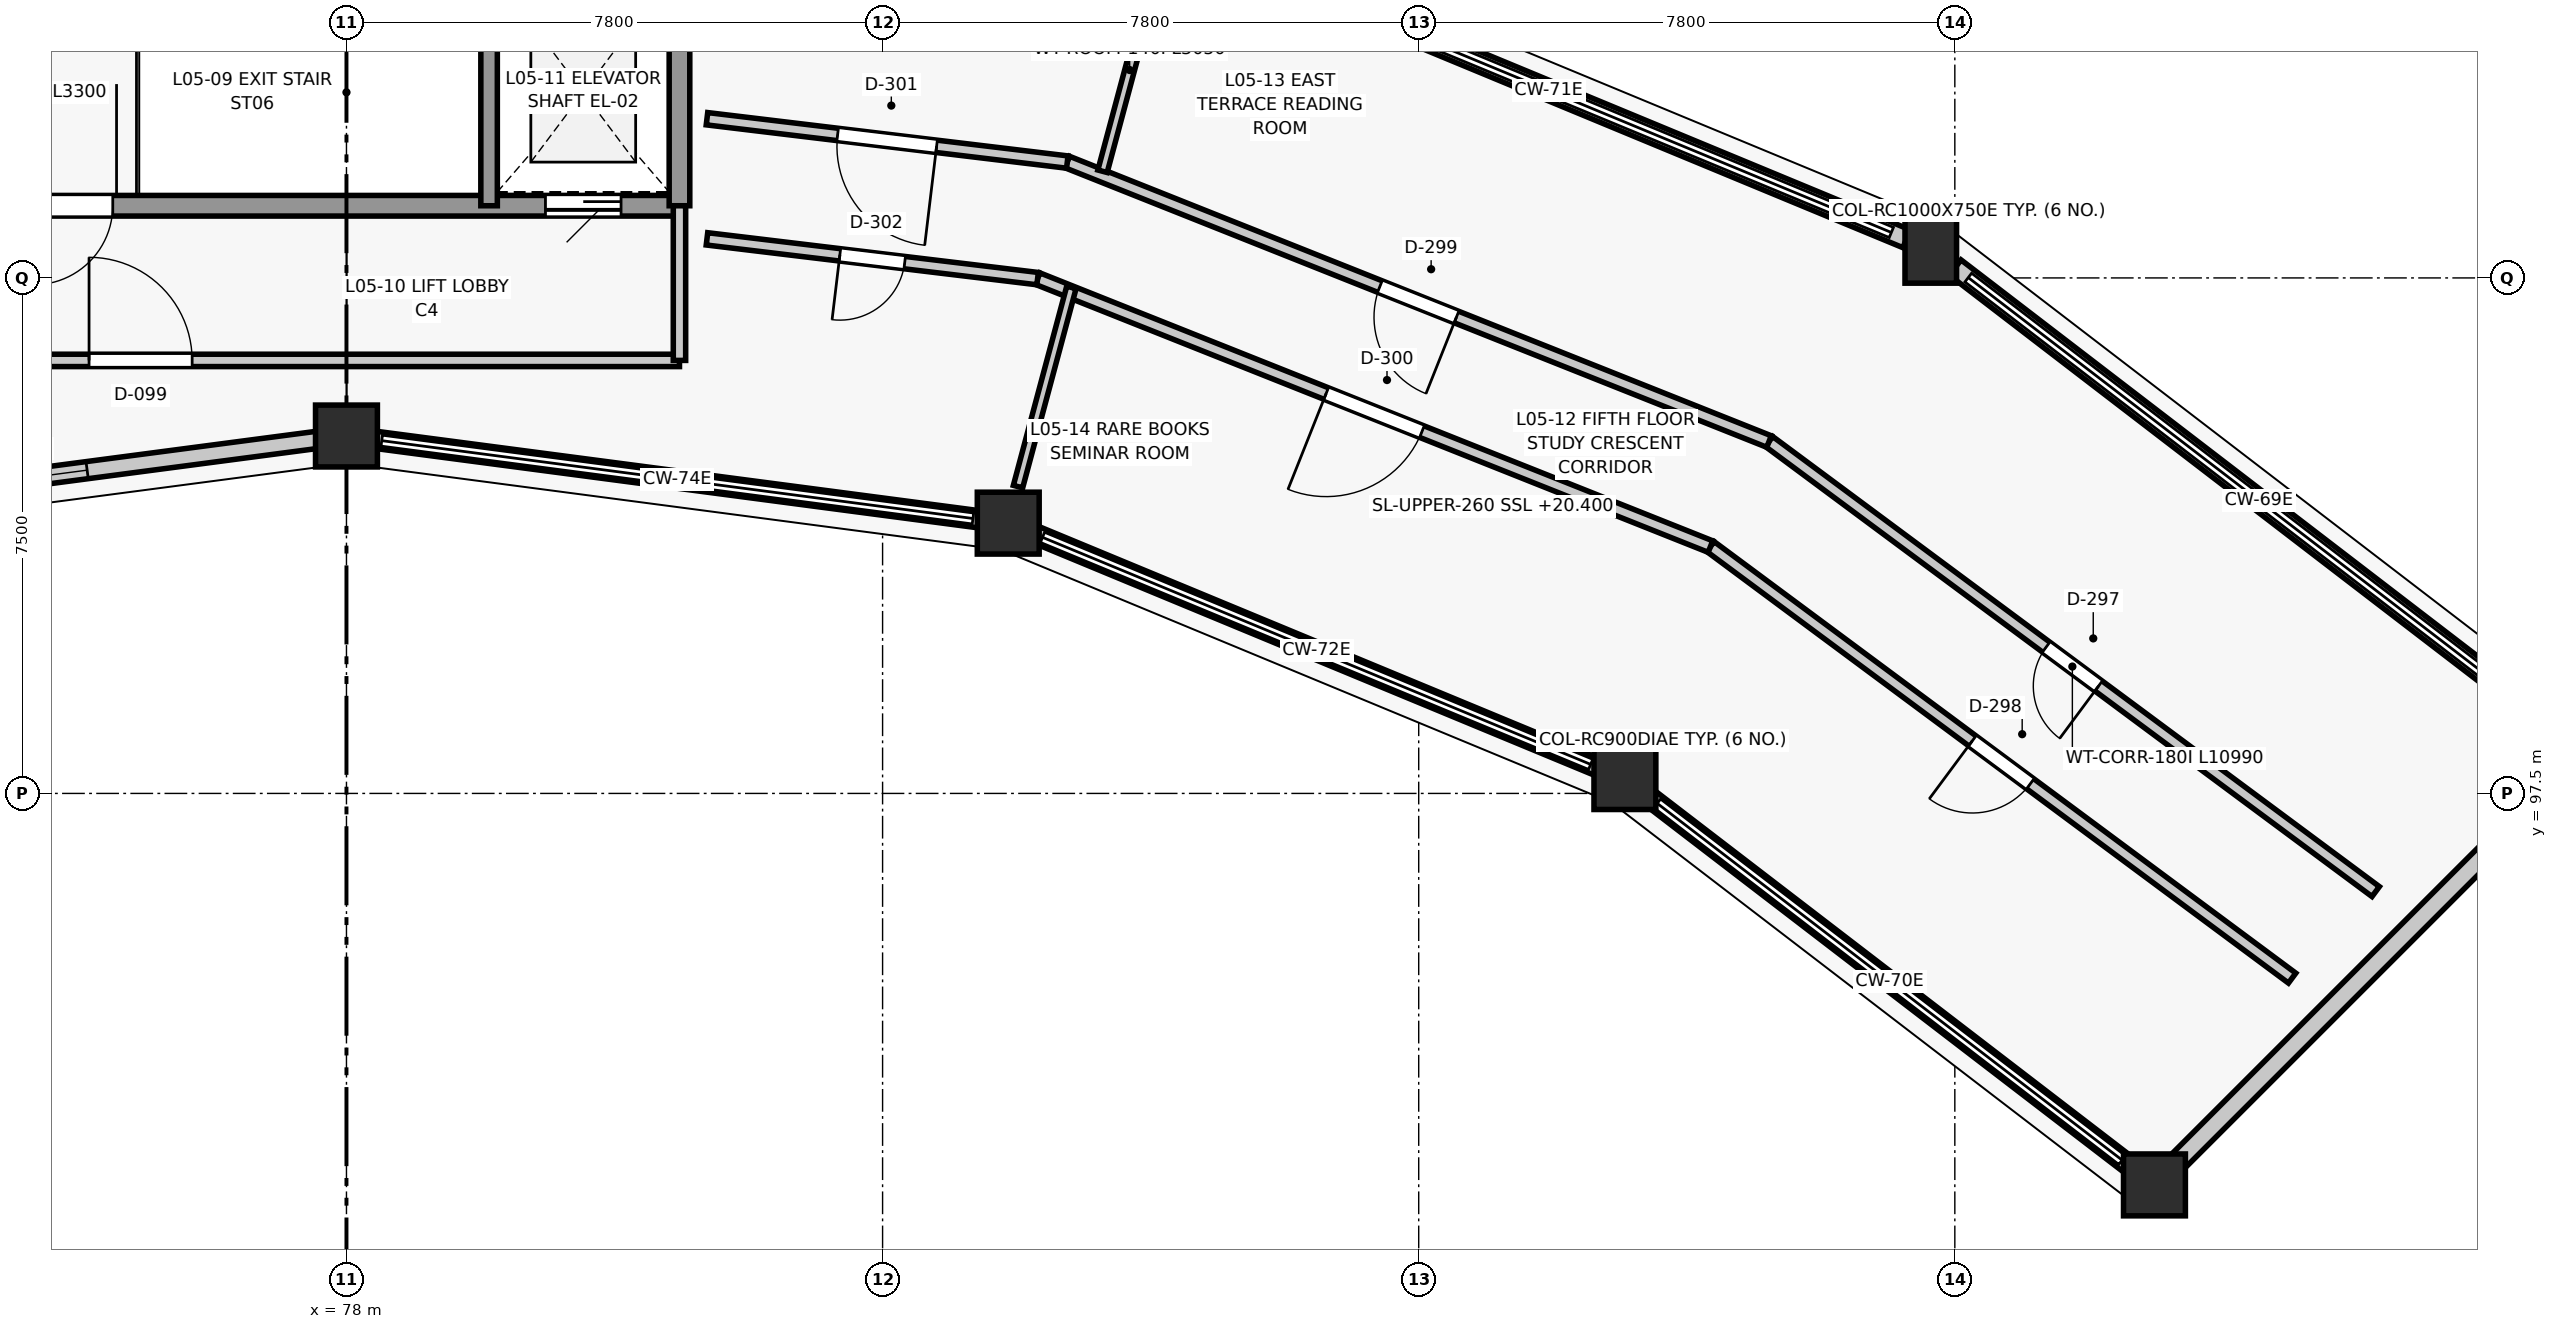
"""IFC4 building model, lengths in metres.
Left out: names, types, materials, properties, quantities, classifications, styles, units other than length and angle.
Written with IfcOpenShell. Run it as: python <this file> out.ifc"""

import sys

from ifc_helpers import new_model, si_unit, direction, frame, frame_2d, origin, origin_2d, place, context, subcontext, project, spatial, rectangle, circle, extrude, element, fill, save


model = new_model("IFC4")
c1 = context("Model", 3, precision=1e-05, world=origin(), true_north=direction((0.0, 1.0)))
c2 = subcontext(c1, "Body", "Model", "MODEL_VIEW")
j1 = project(units=[si_unit("LENGTHUNIT", "METRE"), si_unit("PLANEANGLEUNIT", "RADIAN")], contexts=[c1])
p1 = place(None, origin())
s1 = spatial("IfcSite", under=j1, at=p1, CompositionType="ELEMENT")
p2 = place(p1, origin())
s2 = spatial("IfcBuilding", under=s1, at=p2, CompositionType="ELEMENT")
p3 = place(p2, frame((0.0, 0.0, 20.4)))
s3 = spatial("IfcBuildingStorey", under=s2, at=p3, CompositionType="ELEMENT", Elevation=20.4)
for number, where, z_axis, x_axis in (
    (1, (96.6, 97.716, 0.0), (0.0, 0.0, 1.0), (1.0, 0.0, 0.0)),
    (2, (87.628, 101.432, 0.0), (0.0, 0.0, 1.0), (1.0, 0.0, 0.0)),
    (3, (78.0, 102.7, 0.0), (0.0, 0.0, 1.0), (1.0, 0.0, 0.0)),
):
    element("IfcColumn", number, at=place(p3, frame(where, z_axis=z_axis, x_axis=x_axis)), inside=s3, PredefinedType="COLUMN", context=c2, shape_type="SweptSolid", body=[
        extrude(circle(Radius=0.45, at=origin_2d()), origin(), (0.0, 0.0, 1.0), 3.9),
    ])
p4 = place(p3, frame((101.05, 105.424, 0.0), z_axis=(0.0, 0.0, 1.0), x_axis=(1.0, 0.0, 0.0)))
e4 = element("IfcColumn", 4, at=p4, inside=s3, PredefinedType="COLUMN", context=c2, shape_type="SweptSolid", body=[
    extrude(rectangle(XDim=0.75, YDim=1.0, at=origin_2d()), origin(), (0.0, 0.0, 1.0), 3.9),
])
p5 = place(p3, frame((104.304, 91.804, 0.0), z_axis=(0.0, 0.0, 1.0), x_axis=(1.0, 0.0, 0.0)))
e5 = element("IfcColumn", 5, at=p5, inside=s3, PredefinedType="COLUMN", context=c2, shape_type="SweptSolid", body=[
    extrude(circle(Radius=0.45, at=origin_2d()), origin(), (0.0, 0.0, 1.0), 3.9),
])
p6 = place(p3, frame((101.405, 105.151, 0.0), z_axis=(0.0, 0.0, 1.0), x_axis=(0.793342066679, -0.608776120785, 0.0)))
e6 = element("IfcWall", 6, at=p6, inside=s3, PredefinedType="STANDARD", context=c2, shape_type="SweptSolid", body=[
    extrude(rectangle(XDim=11.139, YDim=0.28, at=frame_2d((5.57, 0.0))), origin(), (0.0, 0.0, 1.0), 0.82),
])
p7 = place(p3, frame((104.024, 92.019, 0.0), z_axis=(0.0, 0.0, 1.0), x_axis=(-0.793347085527, 0.608769580289, 0.0)))
e7 = element("IfcWall", 7, at=p7, inside=s3, PredefinedType="STANDARD", context=c2, shape_type="SweptSolid", body=[
    extrude(rectangle(XDim=9.005, YDim=0.25, at=frame_2d((4.502, 0.0))), origin(), (0.0, 0.0, 1.0), 0.82),
])
p8 = place(p3, frame((90.283, 109.883, 0.0), z_axis=(0.0, 0.0, 1.0), x_axis=(0.923883530636, -0.382673779896, 0.0)))
e8 = element("IfcWall", 8, at=p8, inside=s3, PredefinedType="STANDARD", context=c2, shape_type="SweptSolid", body=[
    extrude(rectangle(XDim=11.272, YDim=0.28, at=frame_2d((5.636, 0.0))), origin(), (0.0, 0.0, 1.0), 0.82),
])
p9 = place(p3, frame((96.323, 97.831, 0.0), z_axis=(0.0, 0.0, 1.0), x_axis=(-0.923880324771, 0.382681519675, 0.0)))
e9 = element("IfcWall", 9, at=p9, inside=s3, PredefinedType="STANDARD", context=c2, shape_type="SweptSolid", body=[
    extrude(rectangle(XDim=9.112, YDim=0.25, at=frame_2d((4.556, 0.0))), origin(), (0.0, 0.0, 1.0), 0.82),
])
p10 = place(p3, frame((87.353, 101.469, 0.0), z_axis=(0.0, 0.0, 1.0), x_axis=(-0.991441766434, 0.130549698469, 0.0)))
e10 = element("IfcWall", 10, at=p10, inside=s3, PredefinedType="STANDARD", context=c2, shape_type="SweptSolid", body=[
    extrude(rectangle(XDim=9.156, YDim=0.25, at=frame_2d((4.578, 0.0))), origin(), (0.0, 0.0, 1.0), 0.82),
])
p11 = place(p3, frame((77.725, 102.664, 0.0), z_axis=(0.0, 0.0, 1.0), x_axis=(-0.991441766434, -0.130549698469, 0.0)))
e11 = element("IfcWall", 11, at=p11, inside=s3, PredefinedType="STANDARD", context=c2, shape_type="SweptSolid", body=[
    extrude(rectangle(XDim=9.156, YDim=0.25, at=frame_2d((4.578, 0.0))), origin(), (0.0, 0.0, 1.0), 2.969),
])
p12 = place(p11, frame((3.528, 0.0, 0.85)))
e12 = element("IfcOpeningElement", 12, at=p12, cuts=e11, PredefinedType="OPENING", context=c2, shape_type="SweptSolid", body=[
    extrude(rectangle(XDim=2.1, YDim=1.75, at=frame_2d((1.05, 0.875))), frame((0.0, 0.135, 0.0), z_axis=(0.0, -1.0, 0.0), x_axis=(1.0, 0.0, 0.0)), (0.0, 0.0, 1.0), 0.27),
])
p13 = place(p3, frame((110.24, 97.74, 0.0), z_axis=(0.0, 0.0, 1.0), x_axis=(-0.707106781187, -0.707106781187, 0.0)))
e13 = element("IfcWall", 13, at=p13, inside=s3, PredefinedType="STANDARD", context=c2, shape_type="SweptSolid", body=[
    extrude(rectangle(XDim=7.995, YDim=0.28, at=frame_2d((3.998, 0.0))), origin(), (0.0, 0.0, 1.0), 3.037),
])
p14 = place(p3, frame((82.845, 106.05, 0.0), z_axis=(0.0, 0.0, 1.0), x_axis=(-1.0, 0.0, 0.0)))
e14 = element("IfcWall", 14, at=p14, inside=s3, PredefinedType="SHEAR", context=c2, shape_type="SweptSolid", body=[
    extrude(rectangle(XDim=9.69, YDim=0.3, at=frame_2d((4.845, 0.0))), origin(), (0.0, 0.0, 1.0), 3.9),
])
p15 = place(p14, frame((8.245, 0.0, 0.0)))
e15 = element("IfcOpeningElement", 15, at=p15, cuts=e14, PredefinedType="OPENING", context=c2, shape_type="SweptSolid", body=[
    extrude(rectangle(XDim=1.15, YDim=2.15, at=frame_2d((0.575, 1.075))), frame((0.0, 0.16, 0.0), z_axis=(0.0, -1.0, 0.0), x_axis=(1.0, 0.0, 0.0)), (0.0, 0.0, 1.0), 0.32),
])
p16 = place(p14, frame((0.85, 0.0, 0.0)))
e16 = element("IfcOpeningElement", 16, at=p16, cuts=e14, PredefinedType="OPENING", context=c2, shape_type="SweptSolid", body=[
    extrude(rectangle(XDim=1.1, YDim=2.15, at=frame_2d((0.55, 1.075))), frame((0.0, 0.16, 0.0), z_axis=(0.0, -1.0, 0.0), x_axis=(1.0, 0.0, 0.0)), (0.0, 0.0, 1.0), 0.32),
])
p17 = place(p3, frame((82.845, 109.35, 0.0), z_axis=(0.0, 0.0, 1.0), x_axis=(0.0, -1.0, 0.0)))
e17 = element("IfcWall", 17, at=p17, inside=s3, PredefinedType="SHEAR", context=c2, shape_type="SweptSolid", body=[
    extrude(rectangle(XDim=3.3, YDim=0.3, at=frame_2d((1.65, 0.0))), origin(), (0.0, 0.0, 1.0), 3.9),
])
p18 = place(p3, frame((80.075, 106.05, 0.0), z_axis=(0.0, 0.0, 1.0), x_axis=(0.0, 1.0, 0.0)))
e18 = element("IfcWall", 18, at=p18, inside=s3, PredefinedType="SHEAR", context=c2, shape_type="SweptSolid", body=[
    extrude(rectangle(XDim=3.3, YDim=0.24, at=frame_2d((1.65, 0.0))), origin(), (0.0, 0.0, 1.0), 3.9),
])
p19 = place(p3, frame((73.155, 103.8, 0.0), z_axis=(0.0, 0.0, 1.0), x_axis=(1.0, 0.0, 0.0)))
e19 = element("IfcWall", 19, at=p19, inside=s3, PredefinedType="PARTITIONING", context=c2, shape_type="SweptSolid", body=[
    extrude(rectangle(XDim=9.69, YDim=0.18, at=frame_2d((4.845, 0.0))), origin(), (0.0, 0.0, 1.0), 3.675),
])
p20 = place(p19, frame((1.1, 0.0, 0.0)))
e20 = element("IfcOpeningElement", 20, at=p20, cuts=e19, PredefinedType="OPENING", context=c2, shape_type="SweptSolid", body=[
    extrude(rectangle(XDim=1.5, YDim=2.15, at=frame_2d((0.75, 1.075))), frame((0.0, 0.1, 0.0), z_axis=(0.0, -1.0, 0.0), x_axis=(1.0, 0.0, 0.0)), (0.0, 0.0, 1.0), 0.2),
])
p21 = place(p3, frame((82.845, 106.05, 0.0), z_axis=(0.0, 0.0, 1.0), x_axis=(0.0, -1.0, 0.0)))
e21 = element("IfcWall", 21, at=p21, inside=s3, PredefinedType="PARTITIONING", context=c2, shape_type="SweptSolid", body=[
    extrude(rectangle(XDim=2.25, YDim=0.18, at=frame_2d((1.125, 0.0))), origin(), (0.0, 0.0, 1.0), 3.675),
])
p22 = place(p3, frame((107.523, 96.072, 0.0), z_axis=(0.0, 0.0, 1.0), x_axis=(-0.803116202906, 0.595822427096, 0.0)))
e22 = element("IfcWall", 22, at=p22, inside=s3, PredefinedType="PARTITIONING", context=c2, shape_type="SweptSolid", body=[
    extrude(rectangle(XDim=10.99, YDim=0.18, at=frame_2d((5.495, 0.0))), origin(), (0.0, 0.0, 1.0), 3.675),
])
p23 = place(p22, frame((5.02, 0.0, 0.0)))
e23 = element("IfcOpeningElement", 23, at=p23, cuts=e22, PredefinedType="OPENING", context=c2, shape_type="SweptSolid", body=[
    extrude(rectangle(XDim=0.95, YDim=2.1, at=frame_2d((0.475, 1.05))), frame((0.0, 0.1, 0.0), z_axis=(0.0, -1.0, 0.0), x_axis=(1.0, 0.0, 0.0)), (0.0, 0.0, 1.0), 0.2),
])
p24 = place(p3, frame((106.307, 94.813, 0.0), z_axis=(0.0, 0.0, 1.0), x_axis=(-0.803116983103, 0.595821375457, 0.0)))
e24 = element("IfcWall", 24, at=p24, inside=s3, PredefinedType="PARTITIONING", context=c2, shape_type="SweptSolid", body=[
    extrude(rectangle(XDim=10.537, YDim=0.18, at=frame_2d((5.269, 0.0))), origin(), (0.0, 0.0, 1.0), 3.675),
])
p25 = place(p24, frame((4.744, 0.0, 0.0)))
e25 = element("IfcOpeningElement", 25, at=p25, cuts=e24, PredefinedType="OPENING", context=c2, shape_type="SweptSolid", body=[
    extrude(rectangle(XDim=1.05, YDim=2.1, at=frame_2d((0.525, 1.05))), frame((0.0, 0.1, 0.0), z_axis=(0.0, -1.0, 0.0), x_axis=(1.0, 0.0, 0.0)), (0.0, 0.0, 1.0), 0.2),
])
p26 = place(p3, frame((98.697, 102.62, 0.0), z_axis=(0.0, 0.0, 1.0), x_axis=(-0.929039440746, 0.369980698873, 0.0)))
e26 = element("IfcWall", 26, at=p26, inside=s3, PredefinedType="PARTITIONING", context=c2, shape_type="SweptSolid", body=[
    extrude(rectangle(XDim=10.99, YDim=0.18, at=frame_2d((5.495, 0.0))), origin(), (0.0, 0.0, 1.0), 3.675),
])
p27 = place(p26, frame((4.895, 0.0, 0.0)))
e27 = element("IfcOpeningElement", 27, at=p27, cuts=e26, PredefinedType="OPENING", context=c2, shape_type="SweptSolid", body=[
    extrude(rectangle(XDim=1.2, YDim=2.15, at=frame_2d((0.6, 1.075))), frame((0.0, 0.1, 0.0), z_axis=(0.0, -1.0, 0.0), x_axis=(1.0, 0.0, 0.0)), (0.0, 0.0, 1.0), 0.2),
])
p28 = place(p3, frame((97.845, 101.091, 0.0), z_axis=(0.0, 0.0, 1.0), x_axis=(-0.929033313581, 0.36999608411, 0.0)))
e28 = element("IfcWall", 28, at=p28, inside=s3, PredefinedType="PARTITIONING", context=c2, shape_type="SweptSolid", body=[
    extrude(rectangle(XDim=10.537, YDim=0.18, at=frame_2d((5.269, 0.0))), origin(), (0.0, 0.0, 1.0), 3.675),
])
p29 = place(p28, frame((4.519, 0.0, 0.0)))
e29 = element("IfcOpeningElement", 29, at=p29, cuts=e28, PredefinedType="OPENING", context=c2, shape_type="SweptSolid", body=[
    extrude(rectangle(XDim=1.5, YDim=2.15, at=frame_2d((0.75, 1.075))), frame((0.0, 0.1, 0.0), z_axis=(0.0, -1.0, 0.0), x_axis=(1.0, 0.0, 0.0)), (0.0, 0.0, 1.0), 0.2),
])
p30 = place(p3, frame((88.487, 106.686, 0.0), z_axis=(0.0, 0.0, 1.0), x_axis=(-0.992847489582, 0.119389540709, 0.0)))
e30 = element("IfcWall", 30, at=p30, inside=s3, PredefinedType="PARTITIONING", context=c2, shape_type="SweptSolid", body=[
    extrude(rectangle(XDim=5.28, YDim=0.18, at=frame_2d((2.64, 0.0))), origin(), (0.0, 0.0, 1.0), 3.675),
])
p31 = place(p30, frame((1.915, 0.0, 0.0)))
e31 = element("IfcOpeningElement", 31, at=p31, cuts=e30, PredefinedType="OPENING", context=c2, shape_type="SweptSolid", body=[
    extrude(rectangle(XDim=1.45, YDim=2.2, at=frame_2d((0.725, 1.1))), frame((0.0, 0.1, 0.0), z_axis=(0.0, -1.0, 0.0), x_axis=(1.0, 0.0, 0.0)), (0.0, 0.0, 1.0), 0.2),
])
p32 = place(p3, frame((88.055, 104.99, 0.0), z_axis=(0.0, 0.0, 1.0), x_axis=(-0.992849152451, 0.119375711422, 0.0)))
e32 = element("IfcWall", 32, at=p32, inside=s3, PredefinedType="PARTITIONING", context=c2, shape_type="SweptSolid", body=[
    extrude(rectangle(XDim=4.845, YDim=0.18, at=frame_2d((2.422, 0.0))), origin(), (0.0, 0.0, 1.0), 3.675),
])
p33 = place(p32, frame((1.948, 0.0, 0.0)))
e33 = element("IfcOpeningElement", 33, at=p33, cuts=e32, PredefinedType="OPENING", context=c2, shape_type="SweptSolid", body=[
    extrude(rectangle(XDim=0.95, YDim=2.1, at=frame_2d((0.475, 1.05))), frame((0.0, 0.1, 0.0), z_axis=(0.0, -1.0, 0.0), x_axis=(1.0, 0.0, 0.0)), (0.0, 0.0, 1.0), 0.2),
])
p34 = place(p3, frame((89.0, 106.552, 0.0), z_axis=(0.0, 0.0, 1.0), x_axis=(0.258868119081, 0.96591267562, 0.0)))
e34 = element("IfcWall", 34, at=p34, inside=s3, PredefinedType="PARTITIONING", context=c2, shape_type="SweptSolid", body=[
    extrude(rectangle(XDim=3.05, YDim=0.14, at=frame_2d((1.525, 0.0))), origin(), (0.0, 0.0, 1.0), 3.037),
])
p35 = place(p3, frame((87.771, 101.964, 0.0), z_axis=(0.0, 0.0, 1.0), x_axis=(0.258776761059, 0.965937155273, 0.0)))
e35 = element("IfcWall", 35, at=p35, inside=s3, PredefinedType="PARTITIONING", context=c2, shape_type="SweptSolid", body=[
    extrude(rectangle(XDim=3.0, YDim=0.14, at=frame_2d((1.5, 0.0))), origin(), (0.0, 0.0, 1.0), 3.037),
])
p36 = place(p12, origin())
e36 = element("IfcWindow", 36, at=p36, inside=s3, PartitioningType="SINGLE_PANEL", PredefinedType="WINDOW", context=c2, shape_type="SweptSolid", body=[
    extrude(rectangle(XDim=2.1, YDim=1.75, at=frame_2d((1.05, 0.875))), frame((0.0, 0.03, 0.0), z_axis=(0.0, -1.0, 0.0), x_axis=(1.0, 0.0, 0.0)), (0.0, 0.0, 1.0), 0.06),
])
fill(e12, e36)
p37 = place(p15, origin())
e37 = element("IfcDoor", 37, at=p37, inside=s3, OperationType="SINGLE_SWING_RIGHT", PredefinedType="DOOR", context=c2, shape_type="SweptSolid", body=[
    extrude(rectangle(XDim=1.15, YDim=2.15, at=frame_2d((0.575, 1.075))), frame((0.0, 0.025, 0.0), z_axis=(0.0, -1.0, 0.0), x_axis=(1.0, 0.0, 0.0)), (0.0, 0.0, 1.0), 0.05),
])
fill(e15, e37)
p38 = place(p16, origin())
e38 = element("IfcDoor", 38, at=p38, inside=s3, OperationType="SLIDING_TO_LEFT", PredefinedType="DOOR", context=c2, shape_type="SweptSolid", body=[
    extrude(rectangle(XDim=1.1, YDim=2.15, at=frame_2d((0.55, 1.075))), frame((0.0, 0.025, 0.0), z_axis=(0.0, -1.0, 0.0), x_axis=(1.0, 0.0, 0.0)), (0.0, 0.0, 1.0), 0.05),
])
fill(e16, e38)
p39 = place(p20, origin())
e39 = element("IfcDoor", 39, at=p39, inside=s3, OperationType="SINGLE_SWING_LEFT", PredefinedType="DOOR", context=c2, shape_type="SweptSolid", body=[
    extrude(rectangle(XDim=1.5, YDim=2.15, at=frame_2d((0.75, 1.075))), frame((0.0, 0.025, 0.0), z_axis=(0.0, -1.0, 0.0), x_axis=(1.0, 0.0, 0.0)), (0.0, 0.0, 1.0), 0.05),
])
fill(e20, e39)
p40 = place(p23, origin())
e40 = element("IfcDoor", 40, at=p40, inside=s3, OperationType="SINGLE_SWING_LEFT", PredefinedType="DOOR", context=c2, shape_type="SweptSolid", body=[
    extrude(rectangle(XDim=0.95, YDim=2.1, at=frame_2d((0.475, 1.05))), frame((0.0, 0.025, 0.0), z_axis=(0.0, -1.0, 0.0), x_axis=(1.0, 0.0, 0.0)), (0.0, 0.0, 1.0), 0.05),
])
fill(e23, e40)
p41 = place(p25, origin())
e41 = element("IfcDoor", 41, at=p41, inside=s3, OperationType="SINGLE_SWING_RIGHT", PredefinedType="DOOR", context=c2, shape_type="SweptSolid", body=[
    extrude(rectangle(XDim=1.05, YDim=2.1, at=frame_2d((0.525, 1.05))), frame((0.0, 0.025, 0.0), z_axis=(0.0, -1.0, 0.0), x_axis=(1.0, 0.0, 0.0)), (0.0, 0.0, 1.0), 0.05),
])
fill(e25, e41)
p42 = place(p27, origin())
e42 = element("IfcDoor", 42, at=p42, inside=s3, OperationType="SINGLE_SWING_LEFT", PredefinedType="DOOR", context=c2, shape_type="SweptSolid", body=[
    extrude(rectangle(XDim=1.2, YDim=2.15, at=frame_2d((0.6, 1.075))), frame((0.0, 0.025, 0.0), z_axis=(0.0, -1.0, 0.0), x_axis=(1.0, 0.0, 0.0)), (0.0, 0.0, 1.0), 0.05),
])
fill(e27, e42)
p43 = place(p29, origin())
e43 = element("IfcDoor", 43, at=p43, inside=s3, OperationType="SINGLE_SWING_RIGHT", PredefinedType="DOOR", context=c2, shape_type="SweptSolid", body=[
    extrude(rectangle(XDim=1.5, YDim=2.15, at=frame_2d((0.75, 1.075))), frame((0.0, 0.025, 0.0), z_axis=(0.0, -1.0, 0.0), x_axis=(1.0, 0.0, 0.0)), (0.0, 0.0, 1.0), 0.05),
])
fill(e29, e43)
p44 = place(p31, origin())
e44 = element("IfcDoor", 44, at=p44, inside=s3, OperationType="SINGLE_SWING_LEFT", PredefinedType="DOOR", context=c2, shape_type="SweptSolid", body=[
    extrude(rectangle(XDim=1.45, YDim=2.2, at=frame_2d((0.725, 1.1))), frame((0.0, 0.025, 0.0), z_axis=(0.0, -1.0, 0.0), x_axis=(1.0, 0.0, 0.0)), (0.0, 0.0, 1.0), 0.05),
])
fill(e31, e44)
p45 = place(p33, origin())
e45 = element("IfcDoor", 45, at=p45, inside=s3, OperationType="SINGLE_SWING_RIGHT", PredefinedType="DOOR", context=c2, shape_type="SweptSolid", body=[
    extrude(rectangle(XDim=0.95, YDim=2.1, at=frame_2d((0.475, 1.05))), frame((0.0, 0.025, 0.0), z_axis=(0.0, -1.0, 0.0), x_axis=(1.0, 0.0, 0.0)), (0.0, 0.0, 1.0), 0.05),
])
fill(e33, e45)
save(model, sys.argv[1])
